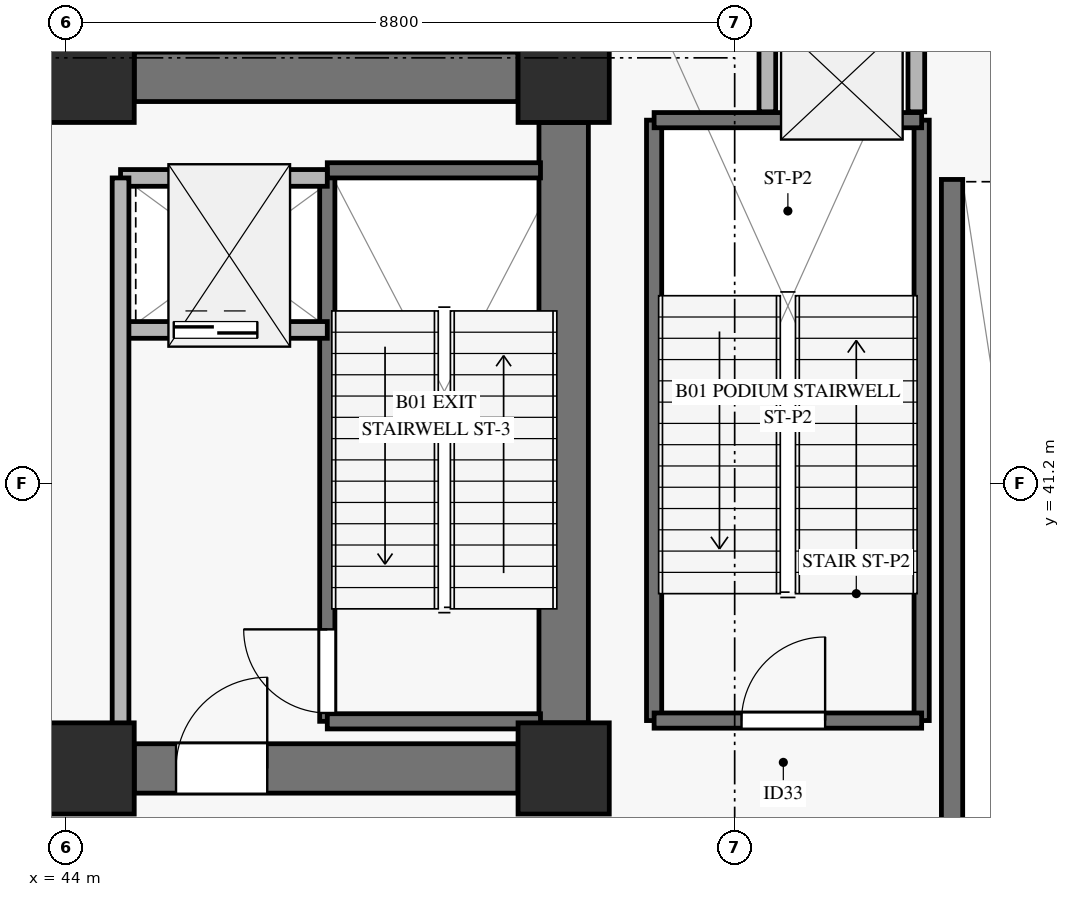
"""IFC4 building model, lengths in metres.
Left out: names, types, materials, properties, quantities, classifications, styles, units other than length and angle.
Written with IfcOpenShell. Run it as: python <this file> out.ifc"""

import sys

from ifc_helpers import new_model, si_unit, direction, frame, frame_2d, origin, origin_2d, place, context, subcontext, project, spatial, rectangle, extrude, source, transform, mapped, element, fill, save


model = new_model("IFC4")
c1 = context("Model", 3, precision=1e-05, world=origin(), true_north=direction((0.0, 1.0)))
c2 = subcontext(c1, "Body", "Model", "MODEL_VIEW")
j1 = project(units=[si_unit("LENGTHUNIT", "METRE"), si_unit("PLANEANGLEUNIT", "RADIAN")], contexts=[c1])
p1 = place(None, origin())
s1 = spatial("IfcSite", under=j1, at=p1, CompositionType="ELEMENT")
p2 = place(p1, origin())
s2 = spatial("IfcBuilding", under=s1, at=p2, CompositionType="ELEMENT")
p3 = place(p2, frame((0.0, 0.0, -5.2)))
s3 = spatial("IfcBuildingStorey", under=s2, at=p3, CompositionType="ELEMENT", Elevation=-5.2)
m1 = source(origin(), c2, "Body", "SweptSolid", [
    extrude(rectangle(XDim=1.2, YDim=1.2, at=origin_2d()), origin(), (0.0, 0.0, 1.0), 4.94),
])
for number, where, z_axis, x_axis in (
    (1, (44.3, 37.45, 0.0), (0.0, 0.0, 1.0), (1.0, 0.0, 0.0)),
    (2, (44.3, 46.55, 0.0), (0.0, 0.0, 1.0), (1.0, 0.0, 0.0)),
    (3, (50.55, 37.45, 0.0), (0.0, 0.0, 1.0), (1.0, 0.0, 0.0)),
    (4, (50.55, 46.55, 0.0), (0.0, 0.0, 1.0), (1.0, 0.0, 0.0)),
):
    element("IfcColumn", number, at=place(p3, frame(where, z_axis=z_axis, x_axis=x_axis)), inside=s3, PredefinedType="PILASTER", context=c2, shape_type="MappedRepresentation", body=[
        mapped(m1, transform((0.0, 0.0, 0.0), x_axis=(1.0, 0.0, 0.0), y_axis=(0.0, 1.0, 0.0), z_axis=(0.0, 0.0, 1.0), scale=1.0)),
    ])
p4 = place(p3, frame((44.9, 46.55, 0.0), z_axis=(0.0, 0.0, 1.0), x_axis=(1.0, 0.0, 0.0)))
e5 = element("IfcWall", 5, at=p4, inside=s3, PredefinedType="SHEAR", context=c2, shape_type="SweptSolid", body=[
    extrude(rectangle(XDim=5.05, YDim=0.65, at=frame_2d((2.525, 0.0))), origin(), (0.0, 0.0, 1.0), 4.94),
])
p5 = place(p3, frame((44.9, 37.45, 0.0), z_axis=(0.0, 0.0, 1.0), x_axis=(1.0, 0.0, 0.0)))
e6 = element("IfcWall", 6, at=p5, inside=s3, PredefinedType="SHEAR", context=c2, shape_type="SweptSolid", body=[
    extrude(rectangle(XDim=5.05, YDim=0.65, at=frame_2d((2.525, 0.0))), origin(), (0.0, 0.0, 1.0), 4.94),
])
p6 = place(p5, frame((0.55, 0.0, 0.0)))
e7 = element("IfcOpeningElement", 7, at=p6, cuts=e6, PredefinedType="OPENING", context=c2, shape_type="SweptSolid", body=[
    extrude(rectangle(XDim=1.2, YDim=2.15, at=frame_2d((0.6, 1.075))), frame((0.0, 0.335, 0.0), z_axis=(0.0, -1.0, 0.0), x_axis=(1.0, 0.0, 0.0)), (0.0, 0.0, 1.0), 0.67),
])
p7 = place(p3, frame((50.55, 38.05, 0.0), z_axis=(0.0, 0.0, 1.0), x_axis=(0.0, 1.0, 0.0)))
e8 = element("IfcWall", 8, at=p7, inside=s3, PredefinedType="SHEAR", context=c2, shape_type="SweptSolid", body=[
    extrude(rectangle(XDim=7.9, YDim=0.65, at=frame_2d((3.95, 0.0))), origin(), (0.0, 0.0, 1.0), 4.94),
])
p8 = place(p3, frame((55.66, 3.46, 0.0), z_axis=(0.0, 0.0, 1.0), x_axis=(0.0, 1.0, 0.0)))
e9 = element("IfcWall", 9, at=p8, inside=s3, PredefinedType="SOLIDWALL", context=c2, shape_type="SweptSolid", body=[
    extrude(rectangle(XDim=41.74, YDim=0.28, at=frame_2d((20.87, 0.0))), origin(), (0.0, 0.0, 1.0), 4.94),
])
p9 = place(p3, frame((47.44, 38.07, 0.0), z_axis=(0.0, 0.0, 1.0), x_axis=(0.0, 1.0, 0.0)))
e10 = element("IfcWall", 10, at=p9, inside=s3, PredefinedType="SOLIDWALL", context=c2, shape_type="SweptSolid", body=[
    extrude(rectangle(XDim=7.25, YDim=0.2, at=frame_2d((3.625, 0.0))), origin(), (0.0, 0.0, 1.0), 5.2),
])
p10 = place(p9, frame((0.11, 0.0, 0.0)))
e11 = element("IfcOpeningElement", 11, at=p10, cuts=e10, PredefinedType="OPENING", context=c2, shape_type="SweptSolid", body=[
    extrude(rectangle(XDim=1.1, YDim=2.15, at=frame_2d((0.55, 1.075))), frame((0.0, 0.11, 0.0), z_axis=(0.0, -1.0, 0.0), x_axis=(1.0, 0.0, 0.0)), (0.0, 0.0, 1.0), 0.22),
])
for number, where, z_axis, x_axis in (
    (12, (47.44, 45.32, 0.0), (0.0, 0.0, 1.0), (1.0, 0.0, 0.0)),
    (13, (47.44, 38.07, 0.0), (0.0, 0.0, 1.0), (1.0, 0.0, 0.0)),
):
    element("IfcWall", number, at=place(p3, frame(where, z_axis=z_axis, x_axis=x_axis)), inside=s3, PredefinedType="SOLIDWALL", context=c2, shape_type="SweptSolid", body=[
        extrude(rectangle(XDim=2.805, YDim=0.2, at=frame_2d((1.403, 0.0))), origin(), (0.0, 0.0, 1.0), 5.2),
    ])
p11 = place(p3, frame((44.72, 43.22, 0.0), z_axis=(0.0, 0.0, 1.0), x_axis=(1.0, 0.0, 0.0)))
e14 = element("IfcWall", 14, at=p11, inside=s3, PredefinedType="SOLIDWALL", context=c2, shape_type="SweptSolid", body=[
    extrude(rectangle(XDim=2.72, YDim=0.22, at=frame_2d((1.36, 0.0))), origin(), (0.0, 0.0, 1.0), 4.94),
])
p12 = place(p11, frame((0.7, 0.0, 0.0)))
e15 = element("IfcOpeningElement", 15, at=p12, cuts=e14, PredefinedType="OPENING", context=c2, shape_type="SweptSolid", body=[
    extrude(rectangle(XDim=1.1, YDim=2.2, at=frame_2d((0.55, 1.1))), frame((0.0, 0.12, 0.0), z_axis=(0.0, -1.0, 0.0), x_axis=(1.0, 0.0, 0.0)), (0.0, 0.0, 1.0), 0.24),
])
p13 = place(p3, frame((44.72, 45.22, 0.0), z_axis=(0.0, 0.0, 1.0), x_axis=(1.0, 0.0, 0.0)))
e16 = element("IfcWall", 16, at=p13, inside=s3, PredefinedType="SOLIDWALL", context=c2, shape_type="SweptSolid", body=[
    extrude(rectangle(XDim=2.72, YDim=0.22, at=frame_2d((1.36, 0.0))), origin(), (0.0, 0.0, 1.0), 4.94),
])
p14 = place(p3, frame((44.72, 37.755, 0.0), z_axis=(0.0, 0.0, 1.0), x_axis=(0.0, 1.0, 0.0)))
e17 = element("IfcWall", 17, at=p14, inside=s3, PredefinedType="SOLIDWALL", context=c2, shape_type="SweptSolid", body=[
    extrude(rectangle(XDim=7.465, YDim=0.22, at=frame_2d((3.732, 0.0))), origin(), (0.0, 0.0, 1.0), 4.94),
])
for number, where, z_axis, x_axis in (
    (18, (51.74, 38.08, 0.0), (0.0, 0.0, 1.0), (0.0, 1.0, 0.0)),
    (19, (55.26, 38.08, 0.0), (0.0, 0.0, 1.0), (0.0, 1.0, 0.0)),
):
    element("IfcWall", number, at=place(p3, frame(where, z_axis=z_axis, x_axis=x_axis)), inside=s3, PredefinedType="SOLIDWALL", context=c2, shape_type="SweptSolid", body=[
        extrude(rectangle(XDim=7.9, YDim=0.2, at=frame_2d((3.95, 0.0))), origin(), (0.0, 0.0, 1.0), 5.2),
    ])
p15 = place(p3, frame((51.74, 45.98, 0.0), z_axis=(0.0, 0.0, 1.0), x_axis=(1.0, 0.0, 0.0)))
e20 = element("IfcWall", 20, at=p15, inside=s3, PredefinedType="SOLIDWALL", context=c2, shape_type="SweptSolid", body=[
    extrude(rectangle(XDim=3.52, YDim=0.2, at=frame_2d((1.76, 0.0))), origin(), (0.0, 0.0, 1.0), 5.2),
])
p16 = place(p3, frame((51.74, 38.08, 0.0), z_axis=(0.0, 0.0, 1.0), x_axis=(1.0, 0.0, 0.0)))
e21 = element("IfcWall", 21, at=p16, inside=s3, PredefinedType="SOLIDWALL", context=c2, shape_type="SweptSolid", body=[
    extrude(rectangle(XDim=3.52, YDim=0.2, at=frame_2d((1.76, 0.0))), origin(), (0.0, 0.0, 1.0), 5.2),
])
p17 = place(p16, frame((1.15, 0.0, 0.0)))
e22 = element("IfcOpeningElement", 22, at=p17, cuts=e21, PredefinedType="OPENING", context=c2, shape_type="SweptSolid", body=[
    extrude(rectangle(XDim=1.1, YDim=2.15, at=frame_2d((0.55, 1.075))), frame((0.0, 0.11, 0.0), z_axis=(0.0, -1.0, 0.0), x_axis=(1.0, 0.0, 0.0)), (0.0, 0.0, 1.0), 0.22),
])
for number, where, z_axis, x_axis in (
    (23, (53.23, 46.09, 0.0), (0.0, 0.0, 1.0), (0.0, 1.0, 0.0)),
    (24, (55.19, 46.09, 0.0), (0.0, 0.0, 1.0), (0.0, 1.0, 0.0)),
):
    element("IfcWall", number, at=place(p3, frame(where, z_axis=z_axis, x_axis=x_axis)), inside=s3, PredefinedType="SOLIDWALL", context=c2, shape_type="SweptSolid", body=[
        extrude(rectangle(XDim=1.29, YDim=0.22, at=frame_2d((0.645, 0.0))), origin(), (0.0, 0.0, 1.0), 4.94),
    ])
m2 = source(origin(), c2, "Body", "SweptSolid", [
    extrude(rectangle(XDim=1.1, YDim=2.15, at=frame_2d((0.55, 1.075))), frame((0.0, 0.025, 0.0), z_axis=(0.0, -1.0, 0.0), x_axis=(1.0, 0.0, 0.0)), (0.0, 0.0, 1.0), 0.05),
])
p18 = place(p10, origin())
e25 = element("IfcDoor", 25, at=p18, inside=s3, OperationType="SINGLE_SWING_RIGHT", PredefinedType="DOOR", context=c2, shape_type="MappedRepresentation", body=[
    mapped(m2, transform((0.0, 0.0, 0.0), x_axis=(1.0, 0.0, 0.0), y_axis=(0.0, 1.0, 0.0), z_axis=(0.0, 0.0, 1.0), scale=1.0)),
])
fill(e11, e25)
m3 = source(origin(), c2, "Body", "SweptSolid", [
    extrude(rectangle(XDim=1.1, YDim=2.2, at=frame_2d((0.55, 1.1))), frame((0.0, 0.025, 0.0), z_axis=(0.0, -1.0, 0.0), x_axis=(1.0, 0.0, 0.0)), (0.0, 0.0, 1.0), 0.05),
])
p19 = place(p12, origin())
e26 = element("IfcDoor", 26, at=p19, inside=s3, OperationType="SLIDING_TO_LEFT", PredefinedType="DOOR", context=c2, shape_type="MappedRepresentation", body=[
    mapped(m3, transform((0.0, 0.0, 0.0), x_axis=(1.0, 0.0, 0.0), y_axis=(0.0, 1.0, 0.0), z_axis=(0.0, 0.0, 1.0), scale=1.0)),
])
fill(e15, e26)
m4 = source(origin(), c2, "Body", "SweptSolid", [
    extrude(rectangle(XDim=1.2, YDim=2.15, at=frame_2d((0.6, 1.075))), frame((0.0, 0.025, 0.0), z_axis=(0.0, -1.0, 0.0), x_axis=(1.0, 0.0, 0.0)), (0.0, 0.0, 1.0), 0.05),
])
p20 = place(p6, origin())
e27 = element("IfcDoor", 27, at=p20, inside=s3, OperationType="SINGLE_SWING_RIGHT", PredefinedType="DOOR", context=c2, shape_type="MappedRepresentation", body=[
    mapped(m4, transform((0.0, 0.0, 0.0), x_axis=(1.0, 0.0, 0.0), y_axis=(0.0, 1.0, 0.0), z_axis=(0.0, 0.0, 1.0), scale=1.0)),
])
fill(e7, e27)
p21 = place(p17, origin())
e28 = element("IfcDoor", 28, at=p21, inside=s3, OperationType="SINGLE_SWING_RIGHT", PredefinedType="DOOR", context=c2, shape_type="MappedRepresentation", body=[
    mapped(m2, transform((0.0, 0.0, 0.0), x_axis=(1.0, 0.0, 0.0), y_axis=(0.0, 1.0, 0.0), z_axis=(0.0, 0.0, 1.0), scale=1.0)),
])
fill(e22, e28)
save(model, sys.argv[1])
